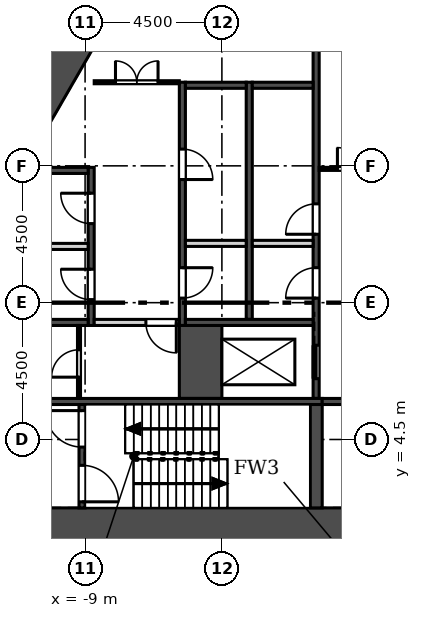
"""IFC4 building model, lengths in metres.
Left out: names, types, materials, properties, quantities, classifications, styles, units other than length and angle.
Written with IfcOpenShell. Run it as: python <this file> out.ifc"""

import sys

from ifc_helpers import new_model, si_unit, direction, frame, frame_2d, origin, place, context, subcontext, project, spatial, rectangle, extrude, element, fill, save


model = new_model("IFC4")
c1 = context("Model", 3, precision=1e-05, world=origin(), true_north=direction((0.0, 1.0)))
c2 = subcontext(c1, "Body", "Model", "MODEL_VIEW")
j1 = project(units=[si_unit("LENGTHUNIT", "METRE"), si_unit("PLANEANGLEUNIT", "RADIAN")], contexts=[c1])
p1 = place(None, origin())
s1 = spatial("IfcSite", under=j1, at=p1, CompositionType="ELEMENT")
p2 = place(p1, origin())
s2 = spatial("IfcBuilding", under=s1, at=p2, CompositionType="ELEMENT")
p3 = place(p2, frame((0.0, 0.0, 174.9)))
s3 = spatial("IfcBuildingStorey", under=s2, at=p3, CompositionType="ELEMENT", Elevation=174.9)
p4 = place(p3, frame((-13.8, 1.65, 0.0), z_axis=(0.0, 0.0, 1.0), x_axis=(1.0, 0.0, 0.0)))
e1 = element("IfcWall", 1, at=p4, inside=s3, PredefinedType="SHEAR", context=c2, shape_type="SweptSolid", body=[
    extrude(rectangle(XDim=27.6, YDim=1.2, at=frame_2d((13.8, 0.0))), origin(), (0.0, 0.0, 1.0), 7.2),
])
p5 = place(p3, frame((-8.777, 18.5, 0.0), z_axis=(0.0, 0.0, 1.0), x_axis=(-0.499998513025, -0.866026262288, 0.0)))
e2 = element("IfcWall", 2, at=p5, inside=s3, PredefinedType="SHEAR", context=c2, shape_type="SweptSolid", body=[
    extrude(rectangle(XDim=9.008, YDim=1.2, at=frame_2d((4.504, 0.0))), origin(), (0.0, 0.0, 1.0), 7.2),
])
p6 = place(p3, frame((-4.353, 49.112, 0.0), z_axis=(0.0, 0.0, 1.0), x_axis=(-0.500002420408, -0.866024006357, 0.0)))
e3 = element("IfcWall", 3, at=p6, inside=s3, PredefinedType="SOLIDWALL", context=c2, shape_type="SweptSolid", body=[
    extrude(rectangle(XDim=47.807, YDim=0.34, at=frame_2d((23.904, 0.0))), origin(), (0.0, 0.0, 1.0), 6.8),
])
p7 = place(p3, frame((-8.8, 8.25, -0.4), z_axis=(0.0, 0.0, 1.0), x_axis=(0.0, 1.0, 0.0)))
e4 = element("IfcWall", 4, at=p7, inside=s3, PredefinedType="SOLIDWALL", context=c2, shape_type="SweptSolid", body=[
    extrude(rectangle(XDim=5.2, YDim=0.2, at=frame_2d((2.6, 0.0))), origin(), (0.0, 0.0, 1.0), 7.2),
])
p8 = place(p7, frame((0.85, 0.0, 0.4)))
e5 = element("IfcOpeningElement", 5, at=p8, cuts=e4, PredefinedType="OPENING", context=c2, shape_type="SweptSolid", body=[
    extrude(rectangle(XDim=1.0, YDim=2.1, at=frame_2d((0.5, 1.05))), frame((0.0, 0.11, 0.0), z_axis=(0.0, -1.0, 0.0), x_axis=(1.0, 0.0, 0.0)), (0.0, 0.0, 1.0), 0.22),
])
p9 = place(p7, frame((3.35, 0.0, 0.4)))
e6 = element("IfcOpeningElement", 6, at=p9, cuts=e4, PredefinedType="OPENING", context=c2, shape_type="SweptSolid", body=[
    extrude(rectangle(XDim=1.0, YDim=2.1, at=frame_2d((0.5, 1.05))), frame((0.0, 0.11, 0.0), z_axis=(0.0, -1.0, 0.0), x_axis=(1.0, 0.0, 0.0)), (0.0, 0.0, 1.0), 0.22),
])
p10 = place(p3, frame((-5.8, 8.25, -0.4), z_axis=(0.0, 0.0, 1.0), x_axis=(0.0, 1.0, 0.0)))
e7 = element("IfcWall", 7, at=p10, inside=s3, PredefinedType="SOLIDWALL", context=c2, shape_type="SweptSolid", body=[
    extrude(rectangle(XDim=8.0, YDim=0.2, at=frame_2d((4.0, 0.0))), origin(), (0.0, 0.0, 1.0), 7.2),
])
p11 = place(p10, frame((0.9, 0.0, 0.4)))
e8 = element("IfcOpeningElement", 8, at=p11, cuts=e7, PredefinedType="OPENING", context=c2, shape_type="SweptSolid", body=[
    extrude(rectangle(XDim=1.0, YDim=2.1, at=frame_2d((0.5, 1.05))), frame((0.0, 0.11, 0.0), z_axis=(0.0, -1.0, 0.0), x_axis=(1.0, 0.0, 0.0)), (0.0, 0.0, 1.0), 0.22),
])
p12 = place(p10, frame((4.8, 0.0, 0.4)))
e9 = element("IfcOpeningElement", 9, at=p12, cuts=e7, PredefinedType="OPENING", context=c2, shape_type="SweptSolid", body=[
    extrude(rectangle(XDim=1.0, YDim=2.1, at=frame_2d((0.5, 1.05))), frame((0.0, 0.11, 0.0), z_axis=(0.0, -1.0, 0.0), x_axis=(1.0, 0.0, 0.0)), (0.0, 0.0, 1.0), 0.22),
])
p13 = place(p3, frame((-3.6, 8.45, -0.4), z_axis=(0.0, 0.0, 1.0), x_axis=(0.0, 1.0, 0.0)))
e10 = element("IfcWall", 10, at=p13, inside=s3, PredefinedType="SOLIDWALL", context=c2, shape_type="SweptSolid", body=[
    extrude(rectangle(XDim=7.8, YDim=0.2, at=frame_2d((3.9, 0.0))), origin(), (0.0, 0.0, 1.0), 7.2),
])
p14 = place(p3, frame((-1.4, 5.85, -0.4), z_axis=(0.0, 0.0, 1.0), x_axis=(0.0, 1.0, 0.0)))
e11 = element("IfcWall", 11, at=p14, inside=s3, PredefinedType="SOLIDWALL", context=c2, shape_type="SweptSolid", body=[
    extrude(rectangle(XDim=11.75, YDim=0.2, at=frame_2d((5.875, 0.0))), origin(), (0.0, 0.0, 1.0), 7.2),
])
p15 = place(p14, frame((0.65, 0.0, 0.4)))
e12 = element("IfcOpeningElement", 12, at=p15, cuts=e11, PredefinedType="OPENING", context=c2, shape_type="SweptSolid", body=[
    extrude(rectangle(XDim=1.1, YDim=2.1, at=frame_2d((0.55, 1.05))), frame((0.0, 0.11, 0.0), z_axis=(0.0, -1.0, 0.0), x_axis=(1.0, 0.0, 0.0)), (0.0, 0.0, 1.0), 0.22),
])
p16 = place(p14, frame((3.3, 0.0, 0.4)))
e13 = element("IfcOpeningElement", 13, at=p16, cuts=e11, PredefinedType="OPENING", context=c2, shape_type="SweptSolid", body=[
    extrude(rectangle(XDim=1.0, YDim=2.1, at=frame_2d((0.5, 1.05))), frame((0.0, 0.11, 0.0), z_axis=(0.0, -1.0, 0.0), x_axis=(1.0, 0.0, 0.0)), (0.0, 0.0, 1.0), 0.22),
])
p17 = place(p14, frame((5.4, 0.0, 0.4)))
e14 = element("IfcOpeningElement", 14, at=p17, cuts=e11, PredefinedType="OPENING", context=c2, shape_type="SweptSolid", body=[
    extrude(rectangle(XDim=1.0, YDim=2.1, at=frame_2d((0.5, 1.05))), frame((0.0, 0.11, 0.0), z_axis=(0.0, -1.0, 0.0), x_axis=(1.0, 0.0, 0.0)), (0.0, 0.0, 1.0), 0.22),
])
p18 = place(p3, frame((-5.2, 5.85, -0.4), z_axis=(0.0, 0.0, 1.0), x_axis=(0.0, 1.0, 0.0)))
e15 = element("IfcWall", 15, at=p18, inside=s3, PredefinedType="SOLIDWALL", context=c2, shape_type="SweptSolid", body=[
    extrude(rectangle(XDim=2.4, YDim=1.4, at=frame_2d((1.2, 0.0))), origin(), (0.0, 0.0, 1.0), 7.2),
])
p19 = place(p3, frame((-10.9, 8.35, -0.4), z_axis=(0.0, 0.0, 1.0), x_axis=(1.0, 0.0, 0.0)))
e16 = element("IfcWall", 16, at=p19, inside=s3, PredefinedType="SOLIDWALL", context=c2, shape_type="SweptSolid", body=[
    extrude(rectangle(XDim=2.0, YDim=0.2, at=frame_2d((1.0, 0.0))), origin(), (0.0, 0.0, 1.0), 7.2),
])
p20 = place(p3, frame((-5.7, 8.35, -0.4), z_axis=(0.0, 0.0, 1.0), x_axis=(1.0, 0.0, 0.0)))
e17 = element("IfcWall", 17, at=p20, inside=s3, PredefinedType="SOLIDWALL", context=c2, shape_type="SweptSolid", body=[
    extrude(rectangle(XDim=4.2, YDim=0.2, at=frame_2d((2.1, 0.0))), origin(), (0.0, 0.0, 1.0), 7.2),
])
p21 = place(p3, frame((-12.6, 5.75, -0.4), z_axis=(0.0, 0.0, 1.0), x_axis=(1.0, 0.0, 0.0)))
e18 = element("IfcWall", 18, at=p21, inside=s3, PredefinedType="SOLIDWALL", context=c2, shape_type="SweptSolid", body=[
    extrude(rectangle(XDim=11.4, YDim=0.2, at=frame_2d((5.7, 0.0))), origin(), (0.0, 0.0, 1.0), 7.2),
])
p22 = place(p3, frame((-1.2, 5.75, -0.4), z_axis=(0.0, 0.0, 1.0), x_axis=(1.0, 0.0, 0.0)))
e19 = element("IfcWall", 19, at=p22, inside=s3, PredefinedType="SOLIDWALL", context=c2, shape_type="SweptSolid", body=[
    extrude(rectangle(XDim=2.4, YDim=0.2, at=frame_2d((1.2, 0.0))), origin(), (0.0, 0.0, 1.0), 7.2),
])
p23 = place(p22, frame((0.7, 0.0, 0.4)))
e20 = element("IfcOpeningElement", 20, at=p23, cuts=e19, PredefinedType="OPENING", context=c2, shape_type="SweptSolid", body=[
    extrude(rectangle(XDim=1.0, YDim=2.1, at=frame_2d((0.5, 1.05))), frame((0.0, 0.11, 0.0), z_axis=(0.0, -1.0, 0.0), x_axis=(1.0, 0.0, 0.0)), (0.0, 0.0, 1.0), 0.22),
])
p24 = place(p3, frame((-9.1, 2.25, -0.4), z_axis=(0.0, 0.0, 1.0), x_axis=(0.0, 1.0, 0.0)))
e21 = element("IfcWall", 21, at=p24, inside=s3, PredefinedType="SOLIDWALL", context=c2, shape_type="SweptSolid", body=[
    extrude(rectangle(XDim=3.4, YDim=0.2, at=frame_2d((1.7, 0.0))), origin(), (0.0, 0.0, 1.0), 7.2),
])
p25 = place(p24, frame((0.2, 0.0, 0.4)))
e22 = element("IfcOpeningElement", 22, at=p25, cuts=e21, PredefinedType="OPENING", context=c2, shape_type="SweptSolid", body=[
    extrude(rectangle(XDim=1.2, YDim=2.1, at=frame_2d((0.6, 1.05))), frame((0.0, 0.11, 0.0), z_axis=(0.0, -1.0, 0.0), x_axis=(1.0, 0.0, 0.0)), (0.0, 0.0, 1.0), 0.22),
])
p26 = place(p24, frame((2.0, 0.0, 0.4)))
e23 = element("IfcOpeningElement", 23, at=p26, cuts=e21, PredefinedType="OPENING", context=c2, shape_type="SweptSolid", body=[
    extrude(rectangle(XDim=1.2, YDim=2.1, at=frame_2d((0.6, 1.05))), frame((0.0, 0.11, 0.0), z_axis=(0.0, -1.0, 0.0), x_axis=(1.0, 0.0, 0.0)), (0.0, 0.0, 1.0), 0.22),
])
p27 = place(p3, frame((-1.4, 2.25, -0.4), z_axis=(0.0, 0.0, 1.0), x_axis=(0.0, 1.0, 0.0)))
e24 = element("IfcWall", 24, at=p27, inside=s3, PredefinedType="SOLIDWALL", context=c2, shape_type="SweptSolid", body=[
    extrude(rectangle(XDim=3.4, YDim=0.4, at=frame_2d((1.7, 0.0))), origin(), (0.0, 0.0, 1.0), 7.2),
])
p28 = place(p3, frame((-10.9, 10.85, 0.0), z_axis=(0.0, 0.0, 1.0), x_axis=(1.0, 0.0, 0.0)))
e25 = element("IfcWall", 25, at=p28, inside=s3, PredefinedType="SOLIDWALL", context=c2, shape_type="SweptSolid", body=[
    extrude(rectangle(XDim=2.0, YDim=0.2, at=frame_2d((1.0, 0.0))), origin(), (0.0, 0.0, 1.0), 6.8),
])
p29 = place(p3, frame((-10.9, 13.35, -0.4), z_axis=(0.0, 0.0, 1.0), x_axis=(1.0, 0.0, 0.0)))
e26 = element("IfcWall", 26, at=p29, inside=s3, PredefinedType="SOLIDWALL", context=c2, shape_type="SweptSolid", body=[
    extrude(rectangle(XDim=2.0, YDim=0.2, at=frame_2d((1.0, 0.0))), origin(), (0.0, 0.0, 1.0), 7.2),
])
p30 = place(p3, frame((-5.7, 10.95, 0.0), z_axis=(0.0, 0.0, 1.0), x_axis=(1.0, 0.0, 0.0)))
e27 = element("IfcWall", 27, at=p30, inside=s3, PredefinedType="SOLIDWALL", context=c2, shape_type="SweptSolid", body=[
    extrude(rectangle(XDim=2.0, YDim=0.2, at=frame_2d((1.0, 0.0))), origin(), (0.0, 0.0, 1.0), 6.8),
])
p31 = place(p3, frame((-5.7, 16.15, -0.4), z_axis=(0.0, 0.0, 1.0), x_axis=(1.0, 0.0, 0.0)))
e28 = element("IfcWall", 28, at=p31, inside=s3, PredefinedType="SOLIDWALL", context=c2, shape_type="SweptSolid", body=[
    extrude(rectangle(XDim=2.0, YDim=0.2, at=frame_2d((1.0, 0.0))), origin(), (0.0, 0.0, 1.0), 7.2),
])
p32 = place(p3, frame((-3.5, 10.95, 0.0), z_axis=(0.0, 0.0, 1.0), x_axis=(1.0, 0.0, 0.0)))
e29 = element("IfcWall", 29, at=p32, inside=s3, PredefinedType="SOLIDWALL", context=c2, shape_type="SweptSolid", body=[
    extrude(rectangle(XDim=2.0, YDim=0.2, at=frame_2d((1.0, 0.0))), origin(), (0.0, 0.0, 1.0), 6.8),
])
p33 = place(p3, frame((-3.5, 16.15, -0.4), z_axis=(0.0, 0.0, 1.0), x_axis=(1.0, 0.0, 0.0)))
e30 = element("IfcWall", 30, at=p33, inside=s3, PredefinedType="SOLIDWALL", context=c2, shape_type="SweptSolid", body=[
    extrude(rectangle(XDim=2.0, YDim=0.2, at=frame_2d((1.0, 0.0))), origin(), (0.0, 0.0, 1.0), 7.2),
])
p34 = place(p3, frame((-8.7, 16.25, 0.0), z_axis=(0.0, 0.0, 1.0), x_axis=(1.0, 0.0, 0.0)))
e31 = element("IfcWall", 31, at=p34, inside=s3, PredefinedType="PARTITIONING", context=c2, shape_type="SweptSolid", body=[
    extrude(rectangle(XDim=2.8, YDim=0.1, at=frame_2d((1.4, 0.0))), origin(), (0.0, 0.0, 1.0), 6.8),
])
p35 = place(p34, frame((0.7, 0.0, 0.0)))
e32 = element("IfcOpeningElement", 32, at=p35, cuts=e31, PredefinedType="OPENING", context=c2, shape_type="SweptSolid", body=[
    extrude(rectangle(XDim=1.4, YDim=2.1, at=frame_2d((0.7, 1.05))), frame((0.0, 0.06, 0.0), z_axis=(0.0, -1.0, 0.0), x_axis=(1.0, 0.0, 0.0)), (0.0, 0.0, 1.0), 0.12),
])
p36 = place(p3, frame((-9.2, 5.85, 0.0), z_axis=(0.0, 0.0, 1.0), x_axis=(0.0, 1.0, 0.0)))
e33 = element("IfcWall", 33, at=p36, inside=s3, PredefinedType="PARTITIONING", context=c2, shape_type="SweptSolid", body=[
    extrude(rectangle(XDim=2.4, YDim=0.1, at=frame_2d((1.2, 0.0))), origin(), (0.0, 0.0, 1.0), 6.8),
])
p37 = place(p36, frame((0.7, 0.0, 0.0)))
e34 = element("IfcOpeningElement", 34, at=p37, cuts=e33, PredefinedType="OPENING", context=c2, shape_type="SweptSolid", body=[
    extrude(rectangle(XDim=0.9, YDim=2.1, at=frame_2d((0.45, 1.05))), frame((0.0, 0.06, 0.0), z_axis=(0.0, -1.0, 0.0), x_axis=(1.0, 0.0, 0.0)), (0.0, 0.0, 1.0), 0.12),
])
p38 = place(p3, frame((-8.7, 8.35, 0.0), z_axis=(0.0, 0.0, 1.0), x_axis=(1.0, 0.0, 0.0)))
e35 = element("IfcWall", 35, at=p38, inside=s3, PredefinedType="SOLIDWALL", context=c2, shape_type="SweptSolid", body=[
    extrude(rectangle(XDim=2.8, YDim=0.2, at=frame_2d((1.4, 0.0))), origin(), (0.0, 0.0, 1.0), 6.8),
])
p39 = place(p38, frame((1.7, 0.0, 0.0)))
e36 = element("IfcOpeningElement", 36, at=p39, cuts=e35, PredefinedType="OPENING", context=c2, shape_type="SweptSolid", body=[
    extrude(rectangle(XDim=1.0, YDim=2.1, at=frame_2d((0.5, 1.05))), frame((0.0, 0.11, 0.0), z_axis=(0.0, -1.0, 0.0), x_axis=(1.0, 0.0, 0.0)), (0.0, 0.0, 1.0), 0.22),
])
p40 = place(p3, frame((-1.3, 13.4, 0.0), z_axis=(0.0, 0.0, 1.0), x_axis=(1.0, 0.0, 0.0)))
e37 = element("IfcWall", 37, at=p40, inside=s3, PredefinedType="PARTITIONING", context=c2, shape_type="SweptSolid", body=[
    extrude(rectangle(XDim=2.6, YDim=0.1, at=frame_2d((1.3, 0.0))), origin(), (0.0, 0.0, 1.0), 6.8),
])
p41 = place(p40, frame((0.6, 0.0, 0.0)))
e38 = element("IfcOpeningElement", 38, at=p41, cuts=e37, PredefinedType="OPENING", context=c2, shape_type="SweptSolid", body=[
    extrude(rectangle(XDim=1.4, YDim=2.1, at=frame_2d((0.7, 1.05))), frame((0.0, 0.06, 0.0), z_axis=(0.0, -1.0, 0.0), x_axis=(1.0, 0.0, 0.0)), (0.0, 0.0, 1.0), 0.12),
])
p42 = place(p3, frame((-9.0, 3.95, 0.0), z_axis=(0.0, 0.0, 1.0), x_axis=(1.0, 0.0, 0.0)))
e39 = element("IfcWall", 39, at=p42, inside=s3, PredefinedType="SOLIDWALL", context=c2, shape_type="SweptSolid", body=[
    extrude(rectangle(XDim=1.6, YDim=0.2, at=frame_2d((0.8, 0.0))), origin(), (0.0, 0.0, 1.0), 6.8),
])
p43 = place(p15, origin())
e40 = element("IfcDoor", 40, at=p43, inside=s3, OperationType="SLIDING_TO_RIGHT", PredefinedType="DOOR", context=c2, shape_type="SweptSolid", body=[
    extrude(rectangle(XDim=1.1, YDim=2.1, at=frame_2d((0.55, 1.05))), frame((0.0, 0.025, 0.0), z_axis=(0.0, -1.0, 0.0), x_axis=(1.0, 0.0, 0.0)), (0.0, 0.0, 1.0), 0.05),
])
fill(e12, e40)
p44 = place(p8, origin())
e41 = element("IfcDoor", 41, at=p44, inside=s3, OperationType="SINGLE_SWING_RIGHT", PredefinedType="DOOR", context=c2, shape_type="SweptSolid", body=[
    extrude(rectangle(XDim=1.0, YDim=2.1, at=frame_2d((0.5, 1.05))), frame((0.0, 0.025, 0.0), z_axis=(0.0, -1.0, 0.0), x_axis=(1.0, 0.0, 0.0)), (0.0, 0.0, 1.0), 0.05),
])
fill(e5, e41)
p45 = place(p9, origin())
e42 = element("IfcDoor", 42, at=p45, inside=s3, OperationType="SINGLE_SWING_RIGHT", PredefinedType="DOOR", context=c2, shape_type="SweptSolid", body=[
    extrude(rectangle(XDim=1.0, YDim=2.1, at=frame_2d((0.5, 1.05))), frame((0.0, 0.025, 0.0), z_axis=(0.0, -1.0, 0.0), x_axis=(1.0, 0.0, 0.0)), (0.0, 0.0, 1.0), 0.05),
])
fill(e6, e42)
p46 = place(p11, frame((1.0, 0.0, 0.0), z_axis=(0.0, 0.0, 1.0), x_axis=(-1.0, 0.0, 0.0)))
e43 = element("IfcDoor", 43, at=p46, inside=s3, OperationType="SINGLE_SWING_LEFT", PredefinedType="DOOR", context=c2, shape_type="SweptSolid", body=[
    extrude(rectangle(XDim=1.0, YDim=2.1, at=frame_2d((0.5, 1.05))), frame((0.0, 0.025, 0.0), z_axis=(0.0, -1.0, 0.0), x_axis=(1.0, 0.0, 0.0)), (0.0, 0.0, 1.0), 0.05),
])
fill(e8, e43)
p47 = place(p12, frame((1.0, 0.0, 0.0), z_axis=(0.0, 0.0, 1.0), x_axis=(-1.0, 0.0, 0.0)))
e44 = element("IfcDoor", 44, at=p47, inside=s3, OperationType="SINGLE_SWING_RIGHT", PredefinedType="DOOR", context=c2, shape_type="SweptSolid", body=[
    extrude(rectangle(XDim=1.0, YDim=2.1, at=frame_2d((0.5, 1.05))), frame((0.0, 0.025, 0.0), z_axis=(0.0, -1.0, 0.0), x_axis=(1.0, 0.0, 0.0)), (0.0, 0.0, 1.0), 0.05),
])
fill(e9, e44)
p48 = place(p16, origin())
e45 = element("IfcDoor", 45, at=p48, inside=s3, OperationType="SINGLE_SWING_LEFT", PredefinedType="DOOR", context=c2, shape_type="SweptSolid", body=[
    extrude(rectangle(XDim=1.0, YDim=2.1, at=frame_2d((0.5, 1.05))), frame((0.0, 0.025, 0.0), z_axis=(0.0, -1.0, 0.0), x_axis=(1.0, 0.0, 0.0)), (0.0, 0.0, 1.0), 0.05),
])
fill(e13, e45)
p49 = place(p17, origin())
e46 = element("IfcDoor", 46, at=p49, inside=s3, OperationType="SINGLE_SWING_LEFT", PredefinedType="DOOR", context=c2, shape_type="SweptSolid", body=[
    extrude(rectangle(XDim=1.0, YDim=2.1, at=frame_2d((0.5, 1.05))), frame((0.0, 0.025, 0.0), z_axis=(0.0, -1.0, 0.0), x_axis=(1.0, 0.0, 0.0)), (0.0, 0.0, 1.0), 0.05),
])
fill(e14, e46)
p50 = place(p35, origin())
e47 = element("IfcDoor", 47, at=p50, inside=s3, OperationType="DOUBLE_DOOR_SINGLE_SWING", PredefinedType="DOOR", context=c2, shape_type="SweptSolid", body=[
    extrude(rectangle(XDim=1.4, YDim=2.1, at=frame_2d((0.7, 1.05))), frame((0.0, 0.025, 0.0), z_axis=(0.0, -1.0, 0.0), x_axis=(1.0, 0.0, 0.0)), (0.0, 0.0, 1.0), 0.05),
])
fill(e32, e47)
p51 = place(p39, frame((1.0, 0.0, 0.0), z_axis=(0.0, 0.0, 1.0), x_axis=(-1.0, 0.0, 0.0)))
e48 = element("IfcDoor", 48, at=p51, inside=s3, OperationType="SINGLE_SWING_LEFT", PredefinedType="DOOR", context=c2, shape_type="SweptSolid", body=[
    extrude(rectangle(XDim=1.0, YDim=2.1, at=frame_2d((0.5, 1.05))), frame((0.0, 0.025, 0.0), z_axis=(0.0, -1.0, 0.0), x_axis=(1.0, 0.0, 0.0)), (0.0, 0.0, 1.0), 0.05),
])
fill(e36, e48)
p52 = place(p37, origin())
e49 = element("IfcDoor", 49, at=p52, inside=s3, OperationType="SINGLE_SWING_LEFT", PredefinedType="DOOR", context=c2, shape_type="SweptSolid", body=[
    extrude(rectangle(XDim=0.9, YDim=2.1, at=frame_2d((0.45, 1.05))), frame((0.0, 0.025, 0.0), z_axis=(0.0, -1.0, 0.0), x_axis=(1.0, 0.0, 0.0)), (0.0, 0.0, 1.0), 0.05),
])
fill(e34, e49)
p53 = place(p25, frame((1.2, 0.0, 0.0), z_axis=(0.0, 0.0, 1.0), x_axis=(-1.0, 0.0, 0.0)))
e50 = element("IfcDoor", 50, at=p53, inside=s3, OperationType="SINGLE_SWING_RIGHT", PredefinedType="DOOR", context=c2, shape_type="SweptSolid", body=[
    extrude(rectangle(XDim=1.2, YDim=2.1, at=frame_2d((0.6, 1.05))), frame((0.0, 0.025, 0.0), z_axis=(0.0, -1.0, 0.0), x_axis=(1.0, 0.0, 0.0)), (0.0, 0.0, 1.0), 0.05),
])
fill(e22, e50)
p54 = place(p41, origin())
e51 = element("IfcDoor", 51, at=p54, inside=s3, OperationType="DOUBLE_DOOR_SINGLE_SWING", PredefinedType="DOOR", context=c2, shape_type="SweptSolid", body=[
    extrude(rectangle(XDim=1.4, YDim=2.1, at=frame_2d((0.7, 1.05))), frame((0.0, 0.025, 0.0), z_axis=(0.0, -1.0, 0.0), x_axis=(1.0, 0.0, 0.0)), (0.0, 0.0, 1.0), 0.05),
])
fill(e38, e51)
p55 = place(p26, origin())
e52 = element("IfcDoor", 52, at=p55, inside=s3, OperationType="SINGLE_SWING_RIGHT", PredefinedType="DOOR", context=c2, shape_type="SweptSolid", body=[
    extrude(rectangle(XDim=1.2, YDim=2.1, at=frame_2d((0.6, 1.05))), frame((0.0, 0.025, 0.0), z_axis=(0.0, -1.0, 0.0), x_axis=(1.0, 0.0, 0.0)), (0.0, 0.0, 1.0), 0.05),
])
fill(e23, e52)
save(model, sys.argv[1])
